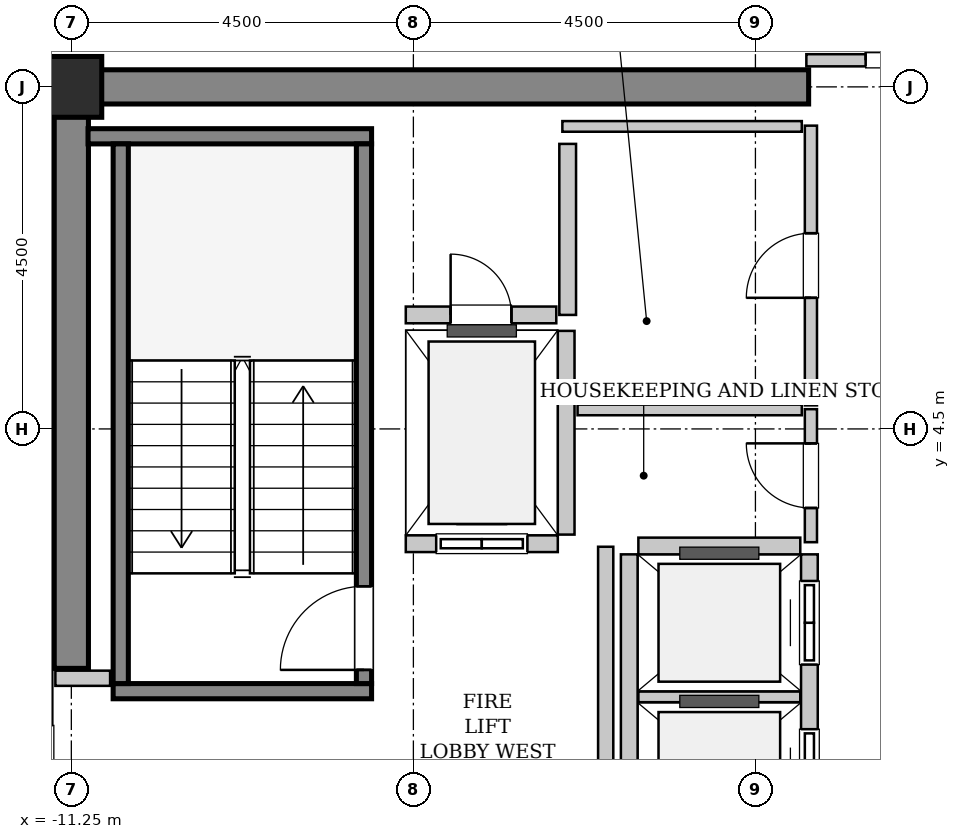
"""IFC4 building model, lengths in metres.
Left out: names, types, materials, properties, quantities, classifications, styles, units other than length and angle.
Written with IfcOpenShell. Run it as: python <this file> out.ifc"""

import sys

from ifc_helpers import new_model, si_unit, direction, frame, frame_2d, origin, origin_2d, place, context, subcontext, project, spatial, rectangle, hollow_rectangle, extrude, source, transform, mapped, element, fill, save


model = new_model("IFC4")
c1 = context("Model", 3, precision=1e-05, world=origin(), true_north=direction((0.0, 1.0)))
c2 = subcontext(c1, "Body", "Model", "MODEL_VIEW")
j1 = project(units=[si_unit("LENGTHUNIT", "METRE"), si_unit("PLANEANGLEUNIT", "RADIAN")], contexts=[c1])
p1 = place(None, origin())
s1 = spatial("IfcSite", under=j1, at=p1, CompositionType="ELEMENT")
p2 = place(p1, origin())
s2 = spatial("IfcBuilding", under=s1, at=p2, CompositionType="ELEMENT")
p3 = place(p2, frame((0.0, 0.0, 298.8)))
s3 = spatial("IfcBuildingStorey", under=s2, at=p3, CompositionType="ELEMENT", Elevation=298.8)
m1 = source(origin(), c2, "Body", "SweptSolid", [
    extrude(rectangle(XDim=9.925, YDim=0.45, at=frame_2d((4.962, 0.0))), origin(), (0.0, 0.0, 1.0), 3.8),
])
p4 = place(p3, frame((-11.475, 9.0, 0.0), z_axis=(0.0, 0.0, 1.0), x_axis=(1.0, 0.0, 0.0)))
e1 = element("IfcWall", 1, at=p4, inside=s3, PredefinedType="SHEAR", context=c2, shape_type="MappedRepresentation", body=[
    mapped(m1, transform((0.0, 0.0, 0.0), x_axis=(1.0, 0.0, 0.0), y_axis=(0.0, 1.0, 0.0), z_axis=(0.0, 0.0, 1.0), scale=1.0)),
])
m2 = source(origin(), c2, "Body", "SweptSolid", [
    extrude(rectangle(XDim=7.425, YDim=0.45, at=frame_2d((3.712, 0.0))), origin(), (0.0, 0.0, 1.0), 3.8),
])
p5 = place(p3, frame((-11.25, 1.35, 0.0), z_axis=(0.0, 0.0, 1.0), x_axis=(0.0, 1.0, 0.0)))
e2 = element("IfcWall", 2, at=p5, inside=s3, PredefinedType="SHEAR", context=c2, shape_type="MappedRepresentation", body=[
    mapped(m2, transform((0.0, 0.0, 0.0), x_axis=(1.0, 0.0, 0.0), y_axis=(0.0, 1.0, 0.0), z_axis=(0.0, 0.0, 1.0), scale=1.0)),
])
m3 = source(origin(), c2, "Body", "SweptSolid", [
    extrude(hollow_rectangle(XDim=0.8, YDim=0.8, WallThickness=0.04, InnerFilletRadius=0.04, OuterFilletRadius=0.08, at=origin_2d()), origin(), (0.0, 0.0, 1.0), 3.8),
])
p6 = place(p3, frame((-11.25, 9.0, 0.0), z_axis=(0.0, 0.0, 1.0), x_axis=(1.0, 0.0, 0.0)))
e3 = element("IfcColumn", 3, at=p6, inside=s3, PredefinedType="COLUMN", context=c2, shape_type="MappedRepresentation", body=[
    mapped(m3, transform((0.0, 0.0, 0.0), x_axis=(1.0, 0.0, 0.0), y_axis=(0.0, 1.0, 0.0), z_axis=(0.0, 0.0, 1.0), scale=1.0)),
])
m4 = source(origin(), c2, "Body", "SweptSolid", [
    extrude(rectangle(XDim=3.4, YDim=0.2, at=frame_2d((1.7, 0.0))), origin(), (0.0, 0.0, 1.0), 3.8),
])
p7 = place(p3, frame((-7.3, 1.05, 0.0), z_axis=(0.0, 0.0, 1.0), x_axis=(-1.0, 0.0, 0.0)))
e4 = element("IfcWall", 4, at=p7, inside=s3, PredefinedType="SOLIDWALL", context=c2, shape_type="MappedRepresentation", body=[
    mapped(m4, transform((0.0, 0.0, 0.0), x_axis=(1.0, 0.0, 0.0), y_axis=(0.0, 1.0, 0.0), z_axis=(0.0, 0.0, 1.0), scale=1.0)),
])
m5 = source(origin(), c2, "Body", "SweptSolid", [
    extrude(rectangle(XDim=3.73, YDim=0.2, at=frame_2d((1.865, 0.0))), origin(), (0.0, 0.0, 1.0), 3.8),
])
p8 = place(p3, frame((-7.3, 8.35, 0.0), z_axis=(0.0, 0.0, 1.0), x_axis=(-1.0, 0.0, 0.0)))
e5 = element("IfcWall", 5, at=p8, inside=s3, PredefinedType="SOLIDWALL", context=c2, shape_type="MappedRepresentation", body=[
    mapped(m5, transform((0.0, 0.0, 0.0), x_axis=(1.0, 0.0, 0.0), y_axis=(0.0, 1.0, 0.0), z_axis=(0.0, 0.0, 1.0), scale=1.0)),
])
m6 = source(origin(), c2, "Body", "SweptSolid", [
    extrude(rectangle(XDim=7.1, YDim=0.2, at=frame_2d((3.55, 0.0))), origin(), (0.0, 0.0, 1.0), 3.8),
])
p9 = place(p3, frame((-7.4, 1.15, 0.0), z_axis=(0.0, 0.0, 1.0), x_axis=(0.0, 1.0, 0.0)))
e6 = element("IfcWall", 6, at=p9, inside=s3, PredefinedType="SOLIDWALL", context=c2, shape_type="MappedRepresentation", body=[
    mapped(m6, transform((0.0, 0.0, 0.0), x_axis=(1.0, 0.0, 0.0), y_axis=(0.0, 1.0, 0.0), z_axis=(0.0, 0.0, 1.0), scale=1.0)),
])
p10 = place(p9, frame((0.18, 0.0, 0.0)))
e7 = element("IfcOpeningElement", 7, at=p10, cuts=e6, PredefinedType="OPENING", context=c2, shape_type="SweptSolid", body=[
    extrude(rectangle(XDim=1.1, YDim=2.15, at=frame_2d((0.55, 1.075))), frame((0.0, 0.11, 0.0), z_axis=(0.0, -1.0, 0.0), x_axis=(1.0, 0.0, 0.0)), (0.0, 0.0, 1.0), 0.22),
])
p11 = place(p3, frame((-10.6, 1.15, 0.0), z_axis=(0.0, 0.0, 1.0), x_axis=(0.0, 1.0, 0.0)))
e8 = element("IfcWall", 8, at=p11, inside=s3, PredefinedType="SOLIDWALL", context=c2, shape_type="MappedRepresentation", body=[
    mapped(m6, transform((0.0, 0.0, 0.0), x_axis=(1.0, 0.0, 0.0), y_axis=(0.0, 1.0, 0.0), z_axis=(0.0, 0.0, 1.0), scale=1.0)),
])
m7 = source(origin(), c2, "Body", "SweptSolid", [
    extrude(rectangle(XDim=2.0, YDim=0.22, at=frame_2d((1.0, 0.0))), origin(), (0.0, 0.0, 1.0), 3.535),
])
p12 = place(p3, frame((-6.85, 2.99, 0.0), z_axis=(0.0, 0.0, 1.0), x_axis=(1.0, 0.0, 0.0)))
e9 = element("IfcWall", 9, at=p12, inside=s3, PredefinedType="SOLIDWALL", context=c2, shape_type="MappedRepresentation", body=[
    mapped(m7, transform((0.0, 0.0, 0.0), x_axis=(1.0, 0.0, 0.0), y_axis=(0.0, 1.0, 0.0), z_axis=(0.0, 0.0, 1.0), scale=1.0)),
])
p13 = place(p12, frame((0.4, 0.0, 0.0)))
e10 = element("IfcOpeningElement", 10, at=p13, cuts=e9, PredefinedType="OPENING", context=c2, shape_type="SweptSolid", body=[
    extrude(rectangle(XDim=1.2, YDim=2.2, at=frame_2d((0.6, 1.1))), frame((0.0, 0.12, 0.0), z_axis=(0.0, -1.0, 0.0), x_axis=(1.0, 0.0, 0.0)), (0.0, 0.0, 1.0), 0.24),
])
m8 = source(origin(), c2, "Body", "SweptSolid", [
    extrude(rectangle(XDim=2.68, YDim=0.22, at=frame_2d((1.34, 0.0))), origin(), (0.0, 0.0, 1.0), 3.535),
])
p14 = place(p3, frame((-4.74, 3.11, 0.0), z_axis=(0.0, 0.0, 1.0), x_axis=(0.0, 1.0, 0.0)))
e11 = element("IfcWall", 11, at=p14, inside=s3, PredefinedType="SOLIDWALL", context=c2, shape_type="MappedRepresentation", body=[
    mapped(m8, transform((0.0, 0.0, 0.0), x_axis=(1.0, 0.0, 0.0), y_axis=(0.0, 1.0, 0.0), z_axis=(0.0, 0.0, 1.0), scale=1.0)),
])
m9 = source(origin(), c2, "Body", "SweptSolid", [
    extrude(rectangle(XDim=5.7, YDim=0.22, at=frame_2d((2.85, 0.0))), origin(), (0.0, 0.0, 1.0), 3.535),
])
p15 = place(p3, frame((-1.54, -2.85, 0.0), z_axis=(0.0, 0.0, 1.0), x_axis=(0.0, 1.0, 0.0)))
e12 = element("IfcWall", 12, at=p15, inside=s3, PredefinedType="SOLIDWALL", context=c2, shape_type="MappedRepresentation", body=[
    mapped(m9, transform((0.0, 0.0, 0.0), x_axis=(1.0, 0.0, 0.0), y_axis=(0.0, 1.0, 0.0), z_axis=(0.0, 0.0, 1.0), scale=1.0)),
])
p16 = place(p15, frame((0.35, 0.0, 0.0)))
e13 = element("IfcOpeningElement", 13, at=p16, cuts=e12, PredefinedType="OPENING", context=c2, shape_type="SweptSolid", body=[
    extrude(rectangle(XDim=1.1, YDim=2.2, at=frame_2d((0.55, 1.1))), frame((0.0, 0.12, 0.0), z_axis=(0.0, -1.0, 0.0), x_axis=(1.0, 0.0, 0.0)), (0.0, 0.0, 1.0), 0.24),
])
p17 = place(p15, frame((2.3, 0.0, 0.0)))
e14 = element("IfcOpeningElement", 14, at=p17, cuts=e12, PredefinedType="OPENING", context=c2, shape_type="SweptSolid", body=[
    extrude(rectangle(XDim=1.1, YDim=2.2, at=frame_2d((0.55, 1.1))), frame((0.0, 0.12, 0.0), z_axis=(0.0, -1.0, 0.0), x_axis=(1.0, 0.0, 0.0)), (0.0, 0.0, 1.0), 0.24),
])
p18 = place(p15, frame((4.25, 0.0, 0.0)))
e15 = element("IfcOpeningElement", 15, at=p18, cuts=e12, PredefinedType="OPENING", context=c2, shape_type="SweptSolid", body=[
    extrude(rectangle(XDim=1.1, YDim=2.2, at=frame_2d((0.55, 1.1))), frame((0.0, 0.12, 0.0), z_axis=(0.0, -1.0, 0.0), x_axis=(1.0, 0.0, 0.0)), (0.0, 0.0, 1.0), 0.24),
])
p19 = place(p3, frame((-3.91, 2.85, 0.0), z_axis=(0.0, 0.0, 1.0), x_axis=(0.0, -1.0, 0.0)))
e16 = element("IfcWall", 16, at=p19, inside=s3, PredefinedType="SOLIDWALL", context=c2, shape_type="MappedRepresentation", body=[
    mapped(m9, transform((0.0, 0.0, 0.0), x_axis=(1.0, 0.0, 0.0), y_axis=(0.0, 1.0, 0.0), z_axis=(0.0, 0.0, 1.0), scale=1.0)),
])
m10 = source(origin(), c2, "Body", "SweptSolid", [
    extrude(rectangle(XDim=2.13, YDim=0.14, at=frame_2d((1.065, 0.0))), origin(), (0.0, 0.0, 1.0), 3.535),
])
p20 = place(p3, frame((-3.79, 0.975, 0.0), z_axis=(0.0, 0.0, 1.0), x_axis=(1.0, 0.0, 0.0)))
e17 = element("IfcWall", 17, at=p20, inside=s3, PredefinedType="PARTITIONING", context=c2, shape_type="MappedRepresentation", body=[
    mapped(m10, transform((0.0, 0.0, 0.0), x_axis=(1.0, 0.0, 0.0), y_axis=(0.0, 1.0, 0.0), z_axis=(0.0, 0.0, 1.0), scale=1.0)),
])
m11 = source(origin(), c2, "Body", "SweptSolid", [
    extrude(rectangle(XDim=2.13, YDim=0.22, at=frame_2d((1.065, 0.0))), origin(), (0.0, 0.0, 1.0), 3.535),
])
p21 = place(p3, frame((-1.66, 2.96, 0.0), z_axis=(0.0, 0.0, 1.0), x_axis=(-1.0, 0.0, 0.0)))
e18 = element("IfcWall", 18, at=p21, inside=s3, PredefinedType="SOLIDWALL", context=c2, shape_type="MappedRepresentation", body=[
    mapped(m11, transform((0.0, 0.0, 0.0), x_axis=(1.0, 0.0, 0.0), y_axis=(0.0, 1.0, 0.0), z_axis=(0.0, 0.0, 1.0), scale=1.0)),
])
m12 = source(origin(), c2, "Body", "SweptSolid", [
    extrude(rectangle(XDim=2.25, YDim=0.22, at=frame_2d((1.125, 0.0))), origin(), (0.0, 0.0, 1.0), 3.535),
])
p22 = place(p3, frame((-4.72, 6.0, 0.0), z_axis=(0.0, 0.0, 1.0), x_axis=(0.0, 1.0, 0.0)))
e19 = element("IfcWall", 19, at=p22, inside=s3, PredefinedType="SOLIDWALL", context=c2, shape_type="MappedRepresentation", body=[
    mapped(m12, transform((0.0, 0.0, 0.0), x_axis=(1.0, 0.0, 0.0), y_axis=(0.0, 1.0, 0.0), z_axis=(0.0, 0.0, 1.0), scale=1.0)),
])
m13 = source(origin(), c2, "Body", "SweptSolid", [
    extrude(rectangle(XDim=1.98, YDim=0.22, at=frame_2d((0.99, 0.0))), origin(), (0.0, 0.0, 1.0), 3.535),
])
p23 = place(p3, frame((-6.85, 6.0, 0.0), z_axis=(0.0, 0.0, 1.0), x_axis=(1.0, 0.0, 0.0)))
e20 = element("IfcWall", 20, at=p23, inside=s3, PredefinedType="SOLIDWALL", context=c2, shape_type="MappedRepresentation", body=[
    mapped(m13, transform((0.0, 0.0, 0.0), x_axis=(1.0, 0.0, 0.0), y_axis=(0.0, 1.0, 0.0), z_axis=(0.0, 0.0, 1.0), scale=1.0)),
])
p24 = place(p23, frame((0.59, 0.0, 0.0)))
e21 = element("IfcOpeningElement", 21, at=p24, cuts=e20, PredefinedType="OPENING", context=c2, shape_type="SweptSolid", body=[
    extrude(rectangle(XDim=0.8, YDim=2.0, at=frame_2d((0.4, 1.0))), frame((0.0, 0.12, 0.0), z_axis=(0.0, -1.0, 0.0), x_axis=(1.0, 0.0, 0.0)), (0.0, 0.0, 1.0), 0.24),
])
m14 = source(origin(), c2, "Body", "SweptSolid", [
    extrude(rectangle(XDim=5.9, YDim=0.2, at=frame_2d((2.95, 0.0))), origin(), (0.0, 0.0, 1.0), 3.535),
])
p25 = place(p3, frame((-4.22, -2.95, 0.0), z_axis=(0.0, 0.0, 1.0), x_axis=(0.0, 1.0, 0.0)))
e22 = element("IfcWall", 22, at=p25, inside=s3, PredefinedType="PARTITIONING", context=c2, shape_type="MappedRepresentation", body=[
    mapped(m14, transform((0.0, 0.0, 0.0), x_axis=(1.0, 0.0, 0.0), y_axis=(0.0, 1.0, 0.0), z_axis=(0.0, 0.0, 1.0), scale=1.0)),
])
m15 = source(origin(), c2, "Body", "SweptSolid", [
    extrude(rectangle(XDim=0.72, YDim=0.2, at=frame_2d((0.36, 0.0))), origin(), (0.0, 0.0, 1.0), 3.535),
])
p26 = place(p3, frame((-11.46, 1.22, 0.0), z_axis=(0.0, 0.0, 1.0), x_axis=(1.0, 0.0, 0.0)))
e23 = element("IfcWall", 23, at=p26, inside=s3, PredefinedType="PARTITIONING", context=c2, shape_type="MappedRepresentation", body=[
    mapped(m15, transform((0.0, 0.0, 0.0), x_axis=(1.0, 0.0, 0.0), y_axis=(0.0, 1.0, 0.0), z_axis=(0.0, 0.0, 1.0), scale=1.0)),
])
m16 = source(origin(), c2, "Body", "SweptSolid", [
    extrude(rectangle(XDim=3.16, YDim=0.16, at=frame_2d((1.58, 0.0))), origin(), (0.0, 0.0, 1.0), 2.625),
])
p27 = place(p3, frame((-1.58, 9.35, 0.0), z_axis=(0.0, 0.0, 1.0), x_axis=(1.0, 0.0, 0.0)))
e24 = element("IfcWall", 24, at=p27, inside=s3, PredefinedType="PARTITIONING", context=c2, shape_type="MappedRepresentation", body=[
    mapped(m16, transform((0.0, 0.0, 0.0), x_axis=(1.0, 0.0, 0.0), y_axis=(0.0, 1.0, 0.0), z_axis=(0.0, 0.0, 1.0), scale=1.0)),
])
p28 = place(p27, frame((0.78, 0.0, 0.0)))
e25 = element("IfcOpeningElement", 25, at=p28, cuts=e24, PredefinedType="OPENING", context=c2, shape_type="SweptSolid", body=[
    extrude(rectangle(XDim=1.6, YDim=2.3, at=frame_2d((0.8, 1.15))), frame((0.0, 0.09, 0.0), z_axis=(0.0, -1.0, 0.0), x_axis=(1.0, 0.0, 0.0)), (0.0, 0.0, 1.0), 0.18),
])
m17 = source(origin(), c2, "Body", "SweptSolid", [
    extrude(rectangle(XDim=1.75, YDim=0.16, at=frame_2d((0.875, 0.0))), origin(), (0.0, 0.0, 1.0), 3.535),
])
p29 = place(p3, frame((-1.52, 3.01, 0.0), z_axis=(0.0, 0.0, 1.0), x_axis=(0.0, 1.0, 0.0)))
e26 = element("IfcWall", 26, at=p29, inside=s3, PredefinedType="PARTITIONING", context=c2, shape_type="MappedRepresentation", body=[
    mapped(m17, transform((0.0, 0.0, 0.0), x_axis=(1.0, 0.0, 0.0), y_axis=(0.0, 1.0, 0.0), z_axis=(0.0, 0.0, 1.0), scale=1.0)),
])
p30 = place(p29, frame((0.45, 0.0, 0.0)))
e27 = element("IfcOpeningElement", 27, at=p30, cuts=e26, PredefinedType="OPENING", context=c2, shape_type="SweptSolid", body=[
    extrude(rectangle(XDim=0.85, YDim=2.1, at=frame_2d((0.425, 1.05))), frame((0.0, 0.09, 0.0), z_axis=(0.0, -1.0, 0.0), x_axis=(1.0, 0.0, 0.0)), (0.0, 0.0, 1.0), 0.18),
])
m18 = source(origin(), c2, "Body", "SweptSolid", [
    extrude(rectangle(XDim=2.95, YDim=0.14, at=frame_2d((1.475, 0.0))), origin(), (0.0, 0.0, 1.0), 3.535),
])
p31 = place(p3, frame((-4.59, 4.75, 0.0), z_axis=(0.0, 0.0, 1.0), x_axis=(1.0, 0.0, 0.0)))
e28 = element("IfcWall", 28, at=p31, inside=s3, PredefinedType="PARTITIONING", context=c2, shape_type="MappedRepresentation", body=[
    mapped(m18, transform((0.0, 0.0, 0.0), x_axis=(1.0, 0.0, 0.0), y_axis=(0.0, 1.0, 0.0), z_axis=(0.0, 0.0, 1.0), scale=1.0)),
])
m19 = source(origin(), c2, "Body", "SweptSolid", [
    extrude(rectangle(XDim=3.68, YDim=0.16, at=frame_2d((1.84, 0.0))), origin(), (0.0, 0.0, 1.0), 3.535),
])
p32 = place(p3, frame((-1.52, 4.81, 0.0), z_axis=(0.0, 0.0, 1.0), x_axis=(0.0, 1.0, 0.0)))
e29 = element("IfcWall", 29, at=p32, inside=s3, PredefinedType="PARTITIONING", context=c2, shape_type="MappedRepresentation", body=[
    mapped(m19, transform((0.0, 0.0, 0.0), x_axis=(1.0, 0.0, 0.0), y_axis=(0.0, 1.0, 0.0), z_axis=(0.0, 0.0, 1.0), scale=1.0)),
])
p33 = place(p32, frame((1.415, 0.0, 0.0)))
e30 = element("IfcOpeningElement", 30, at=p33, cuts=e29, PredefinedType="OPENING", context=c2, shape_type="SweptSolid", body=[
    extrude(rectangle(XDim=0.85, YDim=2.1, at=frame_2d((0.425, 1.05))), frame((0.0, 0.09, 0.0), z_axis=(0.0, -1.0, 0.0), x_axis=(1.0, 0.0, 0.0)), (0.0, 0.0, 1.0), 0.18),
])
m20 = source(origin(), c2, "Body", "SweptSolid", [
    extrude(rectangle(XDim=3.15, YDim=0.14, at=frame_2d((1.575, 0.0))), origin(), (0.0, 0.0, 1.0), 3.535),
])
p34 = place(p3, frame((-4.79, 8.48, 0.0), z_axis=(0.0, 0.0, 1.0), x_axis=(1.0, 0.0, 0.0)))
e31 = element("IfcWall", 31, at=p34, inside=s3, PredefinedType="PARTITIONING", context=c2, shape_type="MappedRepresentation", body=[
    mapped(m20, transform((0.0, 0.0, 0.0), x_axis=(1.0, 0.0, 0.0), y_axis=(0.0, 1.0, 0.0), z_axis=(0.0, 0.0, 1.0), scale=1.0)),
])
m21 = source(origin(), c2, "Body", "SweptSolid", [
    extrude(rectangle(XDim=1.1, YDim=2.15, at=frame_2d((0.55, 1.075))), frame((0.0, 0.025, 0.0), z_axis=(0.0, -1.0, 0.0), x_axis=(1.0, 0.0, 0.0)), (0.0, 0.0, 1.0), 0.05),
])
p35 = place(p10, origin())
e32 = element("IfcDoor", 32, at=p35, inside=s3, OperationType="SINGLE_SWING_LEFT", PredefinedType="DOOR", context=c2, shape_type="MappedRepresentation", body=[
    mapped(m21, transform((0.0, 0.0, 0.0), x_axis=(1.0, 0.0, 0.0), y_axis=(0.0, 1.0, 0.0), z_axis=(0.0, 0.0, 1.0), scale=1.0)),
])
fill(e7, e32)
m22 = source(origin(), c2, "Body", "SweptSolid", [
    extrude(rectangle(XDim=1.2, YDim=2.2, at=frame_2d((0.6, 1.1))), frame((0.0, 0.025, 0.0), z_axis=(0.0, -1.0, 0.0), x_axis=(1.0, 0.0, 0.0)), (0.0, 0.0, 1.0), 0.05),
])
p36 = place(p13, origin())
e33 = element("IfcDoor", 33, at=p36, inside=s3, OperationType="SLIDING_TO_LEFT", PredefinedType="DOOR", context=c2, shape_type="MappedRepresentation", body=[
    mapped(m22, transform((0.0, 0.0, 0.0), x_axis=(1.0, 0.0, 0.0), y_axis=(0.0, 1.0, 0.0), z_axis=(0.0, 0.0, 1.0), scale=1.0)),
])
fill(e10, e33)
m23 = source(origin(), c2, "Body", "SweptSolid", [
    extrude(rectangle(XDim=1.1, YDim=2.2, at=frame_2d((0.55, 1.1))), frame((0.0, 0.025, 0.0), z_axis=(0.0, -1.0, 0.0), x_axis=(1.0, 0.0, 0.0)), (0.0, 0.0, 1.0), 0.05),
])
p37 = place(p17, origin())
e34 = element("IfcDoor", 34, at=p37, inside=s3, OperationType="DOUBLE_DOOR_SLIDING", PredefinedType="DOOR", context=c2, shape_type="MappedRepresentation", body=[
    mapped(m23, transform((0.0, 0.0, 0.0), x_axis=(1.0, 0.0, 0.0), y_axis=(0.0, 1.0, 0.0), z_axis=(0.0, 0.0, 1.0), scale=1.0)),
])
fill(e14, e34)
p38 = place(p18, origin())
e35 = element("IfcDoor", 35, at=p38, inside=s3, OperationType="DOUBLE_DOOR_SLIDING", PredefinedType="DOOR", context=c2, shape_type="MappedRepresentation", body=[
    mapped(m23, transform((0.0, 0.0, 0.0), x_axis=(1.0, 0.0, 0.0), y_axis=(0.0, 1.0, 0.0), z_axis=(0.0, 0.0, 1.0), scale=1.0)),
])
fill(e15, e35)
m24 = source(origin(), c2, "Body", "SweptSolid", [
    extrude(rectangle(XDim=0.8, YDim=2.0, at=frame_2d((0.4, 1.0))), frame((0.0, 0.025, 0.0), z_axis=(0.0, -1.0, 0.0), x_axis=(1.0, 0.0, 0.0)), (0.0, 0.0, 1.0), 0.05),
])
p39 = place(p24, origin())
e36 = element("IfcDoor", 36, at=p39, inside=s3, OperationType="SINGLE_SWING_LEFT", PredefinedType="TRAPDOOR", context=c2, shape_type="MappedRepresentation", body=[
    mapped(m24, transform((0.0, 0.0, 0.0), x_axis=(1.0, 0.0, 0.0), y_axis=(0.0, 1.0, 0.0), z_axis=(0.0, 0.0, 1.0), scale=1.0)),
])
fill(e21, e36)
m25 = source(origin(), c2, "Body", "SweptSolid", [
    extrude(rectangle(XDim=1.6, YDim=2.3, at=frame_2d((0.8, 1.15))), frame((0.0, 0.025, 0.0), z_axis=(0.0, -1.0, 0.0), x_axis=(1.0, 0.0, 0.0)), (0.0, 0.0, 1.0), 0.05),
])
p40 = place(p28, origin())
e37 = element("IfcDoor", 37, at=p40, inside=s3, OperationType="DOUBLE_DOOR_SINGLE_SWING", PredefinedType="DOOR", context=c2, shape_type="MappedRepresentation", body=[
    mapped(m25, transform((0.0, 0.0, 0.0), x_axis=(1.0, 0.0, 0.0), y_axis=(0.0, 1.0, 0.0), z_axis=(0.0, 0.0, 1.0), scale=1.0)),
])
fill(e25, e37)
m26 = source(origin(), c2, "Body", "SweptSolid", [
    extrude(rectangle(XDim=0.85, YDim=2.1, at=frame_2d((0.425, 1.05))), frame((0.0, 0.025, 0.0), z_axis=(0.0, -1.0, 0.0), x_axis=(1.0, 0.0, 0.0)), (0.0, 0.0, 1.0), 0.05),
])
p41 = place(p30, origin())
e38 = element("IfcDoor", 38, at=p41, inside=s3, OperationType="SINGLE_SWING_RIGHT", PredefinedType="DOOR", context=c2, shape_type="MappedRepresentation", body=[
    mapped(m26, transform((0.0, 0.0, 0.0), x_axis=(1.0, 0.0, 0.0), y_axis=(0.0, 1.0, 0.0), z_axis=(0.0, 0.0, 1.0), scale=1.0)),
])
fill(e27, e38)
p42 = place(p33, origin())
e39 = element("IfcDoor", 39, at=p42, inside=s3, OperationType="SINGLE_SWING_LEFT", PredefinedType="DOOR", context=c2, shape_type="MappedRepresentation", body=[
    mapped(m26, transform((0.0, 0.0, 0.0), x_axis=(1.0, 0.0, 0.0), y_axis=(0.0, 1.0, 0.0), z_axis=(0.0, 0.0, 1.0), scale=1.0)),
])
fill(e30, e39)
save(model, sys.argv[1])
